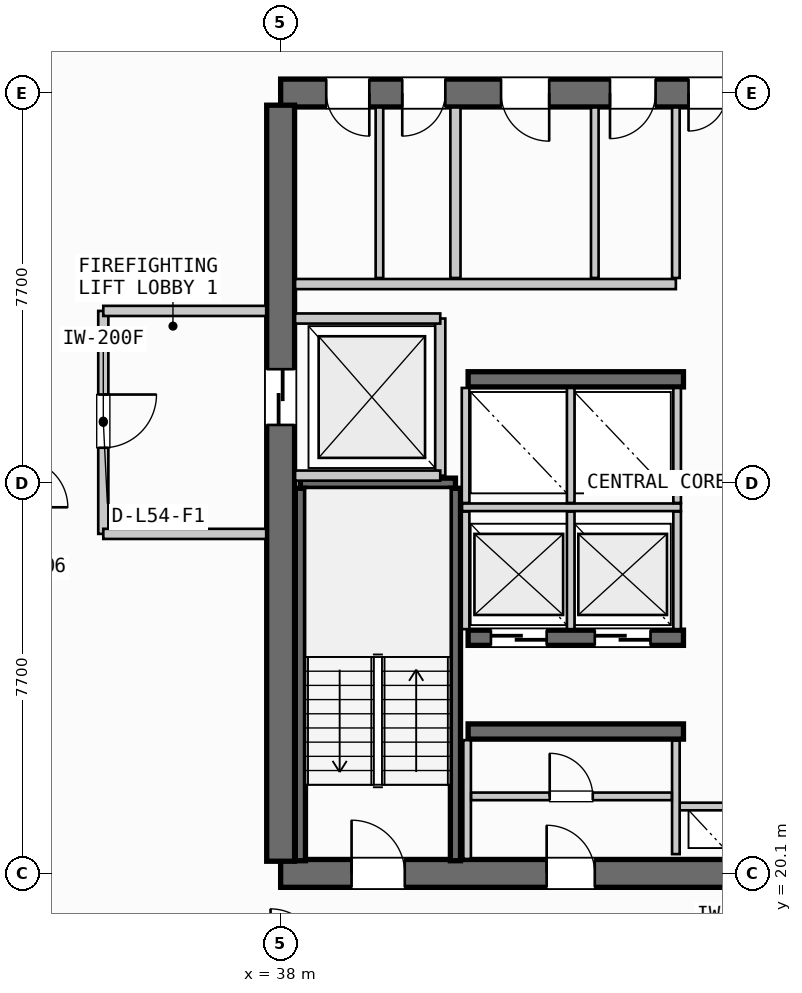
"""IFC4 building model, lengths in metres.
Left out: names, types, materials, properties, quantities, classifications, styles, units other than length and angle.
Written with IfcOpenShell. Run it as: python <this file> out.ifc"""

import sys

from ifc_helpers import new_model, si_unit, direction, frame, frame_2d, origin, place, context, subcontext, project, spatial, rectangle, extrude, source, transform, mapped, element, fill, save


model = new_model("IFC4")
c1 = context("Model", 3, precision=1e-05, world=origin(), true_north=direction((0.0, 1.0)))
c2 = subcontext(c1, "Body", "Model", "MODEL_VIEW")
j1 = project(units=[si_unit("LENGTHUNIT", "METRE"), si_unit("PLANEANGLEUNIT", "RADIAN")], contexts=[c1])
p1 = place(None, origin())
s1 = spatial("IfcSite", under=j1, at=p1, CompositionType="ELEMENT")
p2 = place(p1, origin())
s2 = spatial("IfcBuilding", under=s1, at=p2, CompositionType="ELEMENT")
p3 = place(p2, frame((0.0, 0.0, 207.9)))
s3 = spatial("IfcBuildingStorey", under=s2, at=p3, CompositionType="ELEMENT", Elevation=207.9)
p4 = place(p3, frame((38.0, 20.1, 0.0), z_axis=(0.0, 0.0, 1.0), x_axis=(1.0, 0.0, 0.0)))
e1 = element("IfcWall", 1, at=p4, inside=s3, PredefinedType="SHEAR", context=c2, shape_type="SweptSolid", body=[
    extrude(rectangle(XDim=17.6, YDim=0.55, at=frame_2d((8.8, 0.0))), origin(), (0.0, 0.0, 1.0), 3.26),
])
p5 = place(p4, frame((1.4, 0.0, 0.0)))
e2 = element("IfcOpeningElement", 2, at=p5, cuts=e1, PredefinedType="OPENING", context=c2, shape_type="SweptSolid", body=[
    extrude(rectangle(XDim=1.05, YDim=2.15, at=frame_2d((0.525, 1.075))), frame((0.0, 0.285, 0.0), z_axis=(0.0, -1.0, 0.0), x_axis=(1.0, 0.0, 0.0)), (0.0, 0.0, 1.0), 0.57),
])
p6 = place(p4, frame((15.15, 0.0, 0.0)))
e3 = element("IfcOpeningElement", 3, at=p6, cuts=e1, PredefinedType="OPENING", context=c2, shape_type="SweptSolid", body=[
    extrude(rectangle(XDim=1.05, YDim=2.15, at=frame_2d((0.525, 1.075))), frame((0.0, 0.285, 0.0), z_axis=(0.0, -1.0, 0.0), x_axis=(1.0, 0.0, 0.0)), (0.0, 0.0, 1.0), 0.57),
])
p7 = place(p4, frame((5.25, 0.0, 0.0)))
e4 = element("IfcOpeningElement", 4, at=p7, cuts=e1, PredefinedType="OPENING", context=c2, shape_type="SweptSolid", body=[
    extrude(rectangle(XDim=0.95, YDim=2.15, at=frame_2d((0.475, 1.075))), frame((0.0, 0.285, 0.0), z_axis=(0.0, -1.0, 0.0), x_axis=(1.0, 0.0, 0.0)), (0.0, 0.0, 1.0), 0.57),
])
p8 = place(p4, frame((11.4, 0.0, 0.0)))
e5 = element("IfcOpeningElement", 5, at=p8, cuts=e1, PredefinedType="OPENING", context=c2, shape_type="SweptSolid", body=[
    extrude(rectangle(XDim=0.95, YDim=2.15, at=frame_2d((0.475, 1.075))), frame((0.0, 0.285, 0.0), z_axis=(0.0, -1.0, 0.0), x_axis=(1.0, 0.0, 0.0)), (0.0, 0.0, 1.0), 0.57),
])
p9 = place(p3, frame((55.6, 35.5, 0.0), z_axis=(0.0, 0.0, 1.0), x_axis=(-1.0, 0.0, 0.0)))
e6 = element("IfcWall", 6, at=p9, inside=s3, PredefinedType="SHEAR", context=c2, shape_type="SweptSolid", body=[
    extrude(rectangle(XDim=17.6, YDim=0.55, at=frame_2d((8.8, 0.0))), origin(), (0.0, 0.0, 1.0), 3.26),
])
p10 = place(p9, frame((8.05, 0.0, 0.0)))
e7 = element("IfcOpeningElement", 7, at=p10, cuts=e6, PredefinedType="OPENING", context=c2, shape_type="SweptSolid", body=[
    extrude(rectangle(XDim=1.5, YDim=2.2, at=frame_2d((0.75, 1.1))), frame((0.0, 0.285, 0.0), z_axis=(0.0, -1.0, 0.0), x_axis=(1.0, 0.0, 0.0)), (0.0, 0.0, 1.0), 0.57),
])
p11 = place(p9, frame((15.85, 0.0, 0.0)))
e8 = element("IfcOpeningElement", 8, at=p11, cuts=e6, PredefinedType="OPENING", context=c2, shape_type="SweptSolid", body=[
    extrude(rectangle(XDim=0.85, YDim=2.15, at=frame_2d((0.425, 1.075))), frame((0.0, 0.285, 0.0), z_axis=(0.0, -1.0, 0.0), x_axis=(1.0, 0.0, 0.0)), (0.0, 0.0, 1.0), 0.57),
])
p12 = place(p9, frame((14.35, 0.0, 0.0)))
e9 = element("IfcOpeningElement", 9, at=p12, cuts=e6, PredefinedType="OPENING", context=c2, shape_type="SweptSolid", body=[
    extrude(rectangle(XDim=0.85, YDim=2.15, at=frame_2d((0.425, 1.075))), frame((0.0, 0.285, 0.0), z_axis=(0.0, -1.0, 0.0), x_axis=(1.0, 0.0, 0.0)), (0.0, 0.0, 1.0), 0.57),
])
p13 = place(p9, frame((12.3, 0.0, 0.0)))
e10 = element("IfcOpeningElement", 10, at=p13, cuts=e6, PredefinedType="OPENING", context=c2, shape_type="SweptSolid", body=[
    extrude(rectangle(XDim=0.95, YDim=2.15, at=frame_2d((0.475, 1.075))), frame((0.0, 0.285, 0.0), z_axis=(0.0, -1.0, 0.0), x_axis=(1.0, 0.0, 0.0)), (0.0, 0.0, 1.0), 0.57),
])
p14 = place(p9, frame((10.2, 0.0, 0.0)))
e11 = element("IfcOpeningElement", 11, at=p14, cuts=e6, PredefinedType="OPENING", context=c2, shape_type="SweptSolid", body=[
    extrude(rectangle(XDim=0.9, YDim=2.15, at=frame_2d((0.45, 1.075))), frame((0.0, 0.285, 0.0), z_axis=(0.0, -1.0, 0.0), x_axis=(1.0, 0.0, 0.0)), (0.0, 0.0, 1.0), 0.57),
])
p15 = place(p3, frame((38.0, 35.26, 0.0), z_axis=(0.0, 0.0, 1.0), x_axis=(0.0, -1.0, 0.0)))
e12 = element("IfcWall", 12, at=p15, inside=s3, PredefinedType="SHEAR", context=c2, shape_type="SweptSolid", body=[
    extrude(rectangle(XDim=14.92, YDim=0.55, at=frame_2d((7.46, 0.0))), origin(), (0.0, 0.0, 1.0), 3.26),
])
p16 = place(p15, frame((5.21, 0.0, 0.0)))
e13 = element("IfcOpeningElement", 13, at=p16, cuts=e12, PredefinedType="OPENING", context=c2, shape_type="SweptSolid", body=[
    extrude(rectangle(XDim=1.1, YDim=2.2, at=frame_2d((0.55, 1.1))), frame((0.0, 0.285, 0.0), z_axis=(0.0, -1.0, 0.0), x_axis=(1.0, 0.0, 0.0)), (0.0, 0.0, 1.0), 0.57),
])
p17 = place(p3, frame((41.7, 22.9, 0.0), z_axis=(0.0, 0.0, 1.0), x_axis=(1.0, 0.0, 0.0)))
e14 = element("IfcWall", 14, at=p17, inside=s3, PredefinedType="SHEAR", context=c2, shape_type="SweptSolid", body=[
    extrude(rectangle(XDim=4.25, YDim=0.3, at=frame_2d((2.125, 0.0))), origin(), (0.0, 0.0, 1.0), 3.26),
])
p18 = place(p3, frame((41.7, 24.75, 0.0), z_axis=(0.0, 0.0, 1.0), x_axis=(1.0, 0.0, 0.0)))
e15 = element("IfcWall", 15, at=p18, inside=s3, PredefinedType="SHEAR", context=c2, shape_type="SweptSolid", body=[
    extrude(rectangle(XDim=4.25, YDim=0.3, at=frame_2d((2.125, 0.0))), origin(), (0.0, 0.0, 1.0), 3.26),
])
p19 = place(p18, frame((0.45, 0.0, 0.0)))
e16 = element("IfcOpeningElement", 16, at=p19, cuts=e15, PredefinedType="OPENING", context=c2, shape_type="SweptSolid", body=[
    extrude(rectangle(XDim=1.1, YDim=2.2, at=frame_2d((0.55, 1.1))), frame((0.0, 0.16, 0.0), z_axis=(0.0, -1.0, 0.0), x_axis=(1.0, 0.0, 0.0)), (0.0, 0.0, 1.0), 0.32),
])
p20 = place(p18, frame((2.5, 0.0, 0.0)))
e17 = element("IfcOpeningElement", 17, at=p20, cuts=e15, PredefinedType="OPENING", context=c2, shape_type="SweptSolid", body=[
    extrude(rectangle(XDim=1.1, YDim=2.2, at=frame_2d((0.55, 1.1))), frame((0.0, 0.16, 0.0), z_axis=(0.0, -1.0, 0.0), x_axis=(1.0, 0.0, 0.0)), (0.0, 0.0, 1.0), 0.32),
])
p21 = place(p3, frame((41.7, 29.85, 0.0), z_axis=(0.0, 0.0, 1.0), x_axis=(1.0, 0.0, 0.0)))
e18 = element("IfcWall", 18, at=p21, inside=s3, PredefinedType="SHEAR", context=c2, shape_type="SweptSolid", body=[
    extrude(rectangle(XDim=4.25, YDim=0.3, at=frame_2d((2.125, 0.0))), origin(), (0.0, 0.0, 1.0), 3.26),
])
p22 = place(p3, frame((38.39, 27.8, 0.0), z_axis=(0.0, 0.0, 1.0), x_axis=(1.0, 0.0, 0.0)))
e19 = element("IfcWall", 19, at=p22, inside=s3, PredefinedType="SHEAR", context=c2, shape_type="SweptSolid", body=[
    extrude(rectangle(XDim=3.06, YDim=0.2, at=frame_2d((1.53, 0.0))), origin(), (0.0, 0.0, 1.0), 3.26),
])
for number, where, z_axis, x_axis in (
    (20, (41.45, 27.7, 0.0), (0.0, 0.0, 1.0), (0.0, -1.0, 0.0)),
    (21, (38.39, 20.35, 0.0), (0.0, 0.0, 1.0), (0.0, 1.0, 0.0)),
):
    element("IfcWall", number, at=place(p3, frame(where, z_axis=z_axis, x_axis=x_axis)), inside=s3, PredefinedType="SHEAR", context=c2, shape_type="SweptSolid", body=[
        extrude(rectangle(XDim=7.35, YDim=0.2, at=frame_2d((3.675, 0.0))), origin(), (0.0, 0.0, 1.0), 3.26),
    ])
p23 = place(p3, frame((45.8, 21.42, 0.0), z_axis=(0.0, 0.0, 1.0), x_axis=(1.0, 0.0, 0.0)))
e22 = element("IfcWall", 22, at=p23, inside=s3, PredefinedType="PARTITIONING", context=c2, shape_type="SweptSolid", body=[
    extrude(rectangle(XDim=2.0, YDim=0.15, at=frame_2d((1.0, 0.0))), origin(), (0.0, 0.0, 1.0), 2.455),
])
p24 = place(p3, frame((45.8, 20.48, 0.0), z_axis=(0.0, 0.0, 1.0), x_axis=(0.0, 1.0, 0.0)))
e23 = element("IfcWall", 23, at=p24, inside=s3, PredefinedType="PARTITIONING", context=c2, shape_type="SweptSolid", body=[
    extrude(rectangle(XDim=2.24, YDim=0.15, at=frame_2d((1.12, 0.0))), origin(), (0.0, 0.0, 1.0), 2.455),
])
p25 = place(p3, frame((41.15, 27.95, 0.0), z_axis=(0.0, 0.0, 1.0), x_axis=(0.0, 1.0, 0.0)))
e24 = element("IfcWall", 24, at=p25, inside=s3, PredefinedType="PARTITIONING", context=c2, shape_type="SweptSolid", body=[
    extrude(rectangle(XDim=3.1, YDim=0.2, at=frame_2d((1.55, 0.0))), origin(), (0.0, 0.0, 1.0), 2.455),
])
for number, where, z_axis, x_axis in (
    (25, (38.285, 27.95, 0.0), (0.0, 0.0, 1.0), (1.0, 0.0, 0.0)),
    (26, (38.285, 31.05, 0.0), (0.0, 0.0, 1.0), (1.0, 0.0, 0.0)),
):
    element("IfcWall", number, at=place(p3, frame(where, z_axis=z_axis, x_axis=x_axis)), inside=s3, PredefinedType="PARTITIONING", context=c2, shape_type="SweptSolid", body=[
        extrude(rectangle(XDim=2.865, YDim=0.2, at=frame_2d((1.433, 0.0))), origin(), (0.0, 0.0, 1.0), 2.455),
    ])
p26 = place(p3, frame((34.5, 31.2, 0.0), z_axis=(0.0, 0.0, 1.0), x_axis=(0.0, -1.0, 0.0)))
e27 = element("IfcWall", 27, at=p26, inside=s3, PredefinedType="PARTITIONING", context=c2, shape_type="SweptSolid", body=[
    extrude(rectangle(XDim=4.4, YDim=0.2, at=frame_2d((2.2, 0.0))), origin(), (0.0, 0.0, 1.0), 2.455),
])
p27 = place(p26, frame((1.65, 0.0, 0.0)))
e28 = element("IfcOpeningElement", 28, at=p27, cuts=e27, PredefinedType="OPENING", context=c2, shape_type="SweptSolid", body=[
    extrude(rectangle(XDim=1.05, YDim=2.15, at=frame_2d((0.525, 1.075))), frame((0.0, 0.11, 0.0), z_axis=(0.0, -1.0, 0.0), x_axis=(1.0, 0.0, 0.0)), (0.0, 0.0, 1.0), 0.22),
])
for number, where, z_axis, x_axis in (
    (29, (34.5, 26.8, 0.0), (0.0, 0.0, 1.0), (1.0, 0.0, 0.0)),
    (30, (34.5, 31.2, 0.0), (0.0, 0.0, 1.0), (1.0, 0.0, 0.0)),
):
    element("IfcWall", number, at=place(p3, frame(where, z_axis=z_axis, x_axis=x_axis)), inside=s3, PredefinedType="PARTITIONING", context=c2, shape_type="SweptSolid", body=[
        extrude(rectangle(XDim=3.215, YDim=0.2, at=frame_2d((1.607, 0.0))), origin(), (0.0, 0.0, 1.0), 2.455),
    ])
p28 = place(p3, frame((41.68, 20.385, 0.0), z_axis=(0.0, 0.0, 1.0), x_axis=(0.0, 1.0, 0.0)))
e31 = element("IfcWall", 31, at=p28, inside=s3, PredefinedType="PARTITIONING", context=c2, shape_type="SweptSolid", body=[
    extrude(rectangle(XDim=2.345, YDim=0.15, at=frame_2d((1.172, 0.0))), origin(), (0.0, 0.0, 1.0), 2.455),
])
p29 = place(p3, frame((41.76, 21.62, 0.0), z_axis=(0.0, 0.0, 1.0), x_axis=(1.0, 0.0, 0.0)))
e32 = element("IfcWall", 32, at=p29, inside=s3, PredefinedType="PARTITIONING", context=c2, shape_type="SweptSolid", body=[
    extrude(rectangle(XDim=3.96, YDim=0.15, at=frame_2d((1.98, 0.0))), origin(), (0.0, 0.0, 1.0), 2.455),
])
p30 = place(p29, frame((1.55, 0.0, 0.0)))
e33 = element("IfcOpeningElement", 33, at=p30, cuts=e32, PredefinedType="OPENING", context=c2, shape_type="SweptSolid", body=[
    extrude(rectangle(XDim=0.85, YDim=2.15, at=frame_2d((0.425, 1.075))), frame((0.0, 0.085, 0.0), z_axis=(0.0, -1.0, 0.0), x_axis=(1.0, 0.0, 0.0)), (0.0, 0.0, 1.0), 0.17),
])
p31 = place(p3, frame((41.58, 27.325, 0.0), z_axis=(0.0, 0.0, 1.0), x_axis=(1.0, 0.0, 0.0)))
e34 = element("IfcWall", 34, at=p31, inside=s3, PredefinedType="PARTITIONING", context=c2, shape_type="SweptSolid", body=[
    extrude(rectangle(XDim=4.32, YDim=0.15, at=frame_2d((2.16, 0.0))), origin(), (0.0, 0.0, 1.0), 2.455),
])
for number, where, z_axis, x_axis in (
    (35, (41.65, 24.92, 0.0), (0.0, 0.0, 1.0), (0.0, 1.0, 0.0)),
    (36, (43.725, 24.92, 0.0), (0.0, 0.0, 1.0), (0.0, 1.0, 0.0)),
    (37, (45.825, 24.92, 0.0), (0.0, 0.0, 1.0), (0.0, 1.0, 0.0)),
):
    element("IfcWall", number, at=place(p3, frame(where, z_axis=z_axis, x_axis=x_axis)), inside=s3, PredefinedType="PARTITIONING", context=c2, shape_type="SweptSolid", body=[
        extrude(rectangle(XDim=2.32, YDim=0.15, at=frame_2d((1.16, 0.0))), origin(), (0.0, 0.0, 1.0), 2.455),
    ])
for number, where, z_axis, x_axis in (
    (38, (41.65, 27.41, 0.0), (0.0, 0.0, 1.0), (0.0, 1.0, 0.0)),
    (39, (43.725, 27.41, 0.0), (0.0, 0.0, 1.0), (0.0, 1.0, 0.0)),
    (40, (45.825, 27.41, 0.0), (0.0, 0.0, 1.0), (0.0, 1.0, 0.0)),
):
    element("IfcWall", number, at=place(p3, frame(where, z_axis=z_axis, x_axis=x_axis)), inside=s3, PredefinedType="PARTITIONING", context=c2, shape_type="SweptSolid", body=[
        extrude(rectangle(XDim=2.27, YDim=0.15, at=frame_2d((1.135, 0.0))), origin(), (0.0, 0.0, 1.0), 2.455),
    ])
p32 = place(p3, frame((41.45, 31.85, 0.0), z_axis=(0.0, 0.0, 1.0), x_axis=(0.0, 1.0, 0.0)))
e41 = element("IfcWall", 41, at=p32, inside=s3, PredefinedType="PARTITIONING", context=c2, shape_type="SweptSolid", body=[
    extrude(rectangle(XDim=3.365, YDim=0.2, at=frame_2d((1.683, 0.0))), origin(), (0.0, 0.0, 1.0), 2.455),
])
p33 = place(p3, frame((38.285, 31.73, 0.0), z_axis=(0.0, 0.0, 1.0), x_axis=(1.0, 0.0, 0.0)))
e42 = element("IfcWall", 42, at=p33, inside=s3, PredefinedType="PARTITIONING", context=c2, shape_type="SweptSolid", body=[
    extrude(rectangle(XDim=7.515, YDim=0.2, at=frame_2d((3.758, 0.0))), origin(), (0.0, 0.0, 1.0), 2.455),
])
for number, where, z_axis, x_axis in (
    (43, (45.8, 31.85, 0.0), (0.0, 0.0, 1.0), (0.0, 1.0, 0.0)),
    (44, (39.95, 31.85, 0.0), (0.0, 0.0, 1.0), (0.0, 1.0, 0.0)),
):
    element("IfcWall", number, at=place(p3, frame(where, z_axis=z_axis, x_axis=x_axis)), inside=s3, PredefinedType="PARTITIONING", context=c2, shape_type="SweptSolid", body=[
        extrude(rectangle(XDim=3.365, YDim=0.15, at=frame_2d((1.683, 0.0))), origin(), (0.0, 0.0, 1.0), 2.455),
    ])
p34 = place(p3, frame((44.2, 31.85, 0.0), z_axis=(0.0, 0.0, 1.0), x_axis=(0.0, 1.0, 0.0)))
e45 = element("IfcWall", 45, at=p34, inside=s3, PredefinedType="PLUMBINGWALL", context=c2, shape_type="SweptSolid", body=[
    extrude(rectangle(XDim=3.365, YDim=0.15, at=frame_2d((1.683, 0.0))), origin(), (0.0, 0.0, 1.0), 2.455),
])
m1 = source(origin(), c2, "Body", "SweptSolid", [
    extrude(rectangle(XDim=1.05, YDim=2.15, at=frame_2d((0.525, 1.075))), frame((0.0, 0.025, 0.0), z_axis=(0.0, -1.0, 0.0), x_axis=(1.0, 0.0, 0.0)), (0.0, 0.0, 1.0), 0.05),
])
p35 = place(p5, origin())
e46 = element("IfcDoor", 46, at=p35, inside=s3, OperationType="SINGLE_SWING_LEFT", PredefinedType="DOOR", context=c2, shape_type="MappedRepresentation", body=[
    mapped(m1, transform((0.0, 0.0, 0.0), scale=1.0)),
])
fill(e2, e46)
m2 = source(origin(), c2, "Body", "SweptSolid", [
    extrude(rectangle(XDim=1.5, YDim=2.2, at=frame_2d((0.75, 1.1))), frame((0.0, 0.025, 0.0), z_axis=(0.0, -1.0, 0.0), x_axis=(1.0, 0.0, 0.0)), (0.0, 0.0, 1.0), 0.05),
])
p36 = place(p10, origin())
e47 = element("IfcDoor", 47, at=p36, inside=s3, OperationType="DOUBLE_DOOR_SINGLE_SWING", PredefinedType="DOOR", context=c2, shape_type="MappedRepresentation", body=[
    mapped(m2, transform((0.0, 0.0, 0.0), scale=1.0)),
])
fill(e7, e47)
m3 = source(origin(), c2, "Body", "SweptSolid", [
    extrude(rectangle(XDim=1.1, YDim=2.2, at=frame_2d((0.55, 1.1))), frame((0.0, 0.025, 0.0), z_axis=(0.0, -1.0, 0.0), x_axis=(1.0, 0.0, 0.0)), (0.0, 0.0, 1.0), 0.05),
])
p37 = place(p16, origin())
e48 = element("IfcDoor", 48, at=p37, inside=s3, OperationType="SLIDING_TO_LEFT", PredefinedType="DOOR", context=c2, shape_type="MappedRepresentation", body=[
    mapped(m3, transform((0.0, 0.0, 0.0), scale=1.0)),
])
fill(e13, e48)
m4 = source(origin(), c2, "Body", "SweptSolid", [
    extrude(rectangle(XDim=0.95, YDim=2.15, at=frame_2d((0.475, 1.075))), frame((0.0, 0.025, 0.0), z_axis=(0.0, -1.0, 0.0), x_axis=(1.0, 0.0, 0.0)), (0.0, 0.0, 1.0), 0.05),
])
p38 = place(p7, origin())
e49 = element("IfcDoor", 49, at=p38, inside=s3, OperationType="SINGLE_SWING_LEFT", PredefinedType="DOOR", context=c2, shape_type="MappedRepresentation", body=[
    mapped(m4, transform((0.0, 0.0, 0.0), scale=1.0)),
])
fill(e4, e49)
p39 = place(p19, origin())
e50 = element("IfcDoor", 50, at=p39, inside=s3, OperationType="SLIDING_TO_RIGHT", PredefinedType="DOOR", context=c2, shape_type="MappedRepresentation", body=[
    mapped(m3, transform((0.0, 0.0, 0.0), scale=1.0)),
])
fill(e16, e50)
p40 = place(p20, origin())
e51 = element("IfcDoor", 51, at=p40, inside=s3, OperationType="SLIDING_TO_RIGHT", PredefinedType="DOOR", context=c2, shape_type="MappedRepresentation", body=[
    mapped(m3, transform((0.0, 0.0, 0.0), scale=1.0)),
])
fill(e17, e51)
m5 = source(origin(), c2, "Body", "SweptSolid", [
    extrude(rectangle(XDim=0.85, YDim=2.15, at=frame_2d((0.425, 1.075))), frame((0.0, 0.025, 0.0), z_axis=(0.0, -1.0, 0.0), x_axis=(1.0, 0.0, 0.0)), (0.0, 0.0, 1.0), 0.05),
])
p41 = place(p11, origin())
e52 = element("IfcDoor", 52, at=p41, inside=s3, OperationType="SINGLE_SWING_LEFT", PredefinedType="DOOR", context=c2, shape_type="MappedRepresentation", body=[
    mapped(m5, transform((0.0, 0.0, 0.0), scale=1.0)),
])
fill(e8, e52)
p42 = place(p12, origin())
e53 = element("IfcDoor", 53, at=p42, inside=s3, OperationType="SINGLE_SWING_RIGHT", PredefinedType="DOOR", context=c2, shape_type="MappedRepresentation", body=[
    mapped(m5, transform((0.0, 0.0, 0.0), scale=1.0)),
])
fill(e9, e53)
p43 = place(p13, origin())
e54 = element("IfcDoor", 54, at=p43, inside=s3, OperationType="SINGLE_SWING_LEFT", PredefinedType="DOOR", context=c2, shape_type="MappedRepresentation", body=[
    mapped(m4, transform((0.0, 0.0, 0.0), scale=1.0)),
])
fill(e10, e54)
m6 = source(origin(), c2, "Body", "SweptSolid", [
    extrude(rectangle(XDim=0.9, YDim=2.15, at=frame_2d((0.45, 1.075))), frame((0.0, 0.025, 0.0), z_axis=(0.0, -1.0, 0.0), x_axis=(1.0, 0.0, 0.0)), (0.0, 0.0, 1.0), 0.05),
])
p44 = place(p14, origin())
e55 = element("IfcDoor", 55, at=p44, inside=s3, OperationType="SINGLE_SWING_RIGHT", PredefinedType="DOOR", context=c2, shape_type="MappedRepresentation", body=[
    mapped(m6, transform((0.0, 0.0, 0.0), scale=1.0)),
])
fill(e11, e55)
p45 = place(p27, origin())
e56 = element("IfcDoor", 56, at=p45, inside=s3, OperationType="SINGLE_SWING_LEFT", PredefinedType="DOOR", context=c2, shape_type="MappedRepresentation", body=[
    mapped(m1, transform((0.0, 0.0, 0.0), scale=1.0)),
])
fill(e28, e56)
p46 = place(p30, origin())
e57 = element("IfcDoor", 57, at=p46, inside=s3, OperationType="SINGLE_SWING_LEFT", PredefinedType="DOOR", context=c2, shape_type="MappedRepresentation", body=[
    mapped(m5, transform((0.0, 0.0, 0.0), scale=1.0)),
])
fill(e33, e57)
save(model, sys.argv[1])
